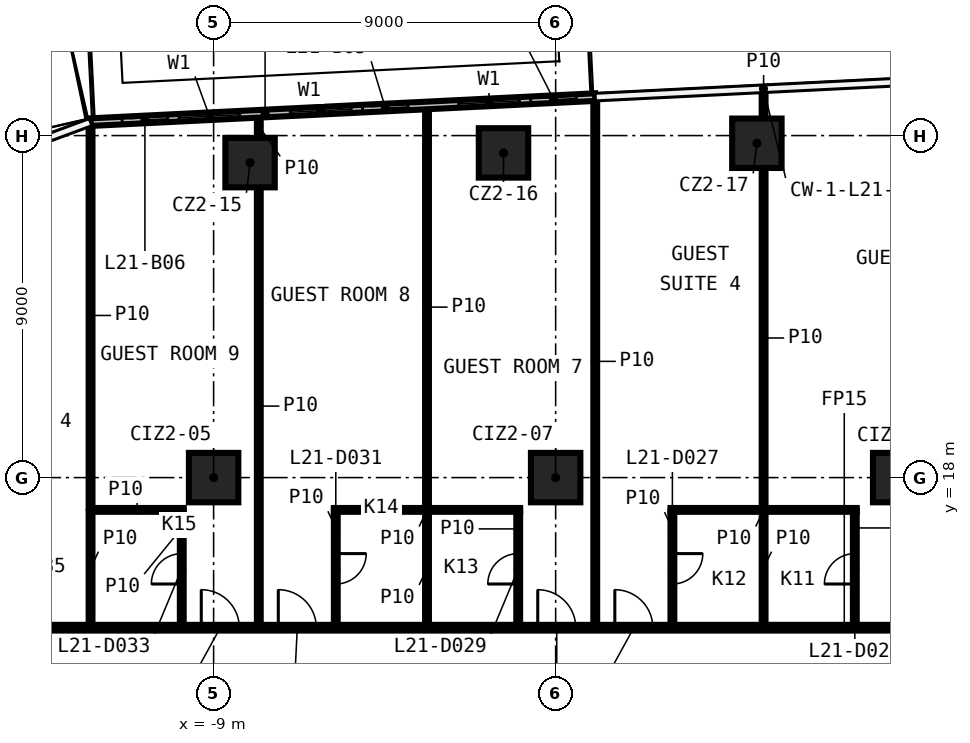
"""IFC4 building model, lengths in metres.
Left out: names, types, materials, properties, quantities, classifications, styles, units other than length and angle.
Written with IfcOpenShell. Run it as: python <this file> out.ifc"""

import sys

from ifc_helpers import new_model, si_unit, direction, frame, frame_2d, origin, origin_2d, place, context, subcontext, project, spatial, rectangle, extrude, element, fill, save


model = new_model("IFC4")
c1 = context("Model", 3, precision=1e-05, world=origin(), true_north=direction((0.0, 1.0)))
c2 = subcontext(c1, "Body", "Model", "MODEL_VIEW")
j1 = project(units=[si_unit("LENGTHUNIT", "METRE"), si_unit("PLANEANGLEUNIT", "RADIAN")], contexts=[c1])
p1 = place(None, origin())
s1 = spatial("IfcSite", under=j1, at=p1, CompositionType="ELEMENT")
p2 = place(p1, origin())
s2 = spatial("IfcBuilding", under=s1, at=p2, CompositionType="ELEMENT")
p3 = place(p2, frame((0.0, 0.0, 102.6)))
s3 = spatial("IfcBuildingStorey", under=s2, at=p3, CompositionType="ELEMENT", Elevation=102.6)
for number, where, z_axis, x_axis in (
    (1, (-8.041, 26.288, 0.0), (0.0, 0.0, 1.0), (1.0, 0.0, 0.0)),
    (2, (-1.372, 26.544, 0.0), (0.0, 0.0, 1.0), (1.0, 0.0, 0.0)),
    (3, (5.295, 26.798, 0.0), (0.0, 0.0, 1.0), (1.0, 0.0, 0.0)),
    (4, (-9.0, 18.0, 0.0), (0.0, 0.0, 1.0), (1.0, 0.0, 0.0)),
    (5, (0.0, 18.0, 0.0), (0.0, 0.0, 1.0), (1.0, 0.0, 0.0)),
    (6, (9.0, 18.0, 0.0), (0.0, 0.0, 1.0), (1.0, 0.0, 0.0)),
):
    element("IfcColumn", number, at=place(p3, frame(where, z_axis=z_axis, x_axis=x_axis)), inside=s3, PredefinedType="COLUMN", context=c2, shape_type="SweptSolid", body=[
        extrude(rectangle(XDim=1.3, YDim=1.3, at=origin_2d()), origin(), (0.0, 0.0, 1.0), 3.3),
    ])
p4 = place(p3, frame((-17.125, 14.05, 0.0), z_axis=(0.0, 0.0, 1.0), x_axis=(1.0, 0.0, 0.0)))
e7 = element("IfcWall", 7, at=p4, inside=s3, PredefinedType="PARTITIONING", context=c2, shape_type="SweptSolid", body=[
    extrude(rectangle(XDim=34.25, YDim=0.15, at=frame_2d((17.125, 0.0))), origin(), (0.0, 0.0, 1.0), 3.3),
])
p5 = place(p4, frame((29.757, 0.0, 0.0)))
e8 = element("IfcOpeningElement", 8, at=p5, cuts=e7, PredefinedType="OPENING", context=c2, shape_type="SweptSolid", body=[
    extrude(rectangle(XDim=1.0, YDim=2.1, at=frame_2d((0.5, 1.05))), frame((0.0, 0.085, 0.0), z_axis=(0.0, -1.0, 0.0), x_axis=(1.0, 0.0, 0.0)), (0.0, 0.0, 1.0), 0.17),
])
p6 = place(p4, frame((18.682, 0.0, 0.0)))
e9 = element("IfcOpeningElement", 9, at=p6, cuts=e7, PredefinedType="OPENING", context=c2, shape_type="SweptSolid", body=[
    extrude(rectangle(XDim=1.0, YDim=2.1, at=frame_2d((0.5, 1.05))), frame((0.0, 0.085, 0.0), z_axis=(0.0, -1.0, 0.0), x_axis=(1.0, 0.0, 0.0)), (0.0, 0.0, 1.0), 0.17),
])
p7 = place(p4, frame((16.654, 0.0, 0.0)))
e10 = element("IfcOpeningElement", 10, at=p7, cuts=e7, PredefinedType="OPENING", context=c2, shape_type="SweptSolid", body=[
    extrude(rectangle(XDim=1.0, YDim=2.1, at=frame_2d((0.5, 1.05))), frame((0.0, 0.085, 0.0), z_axis=(0.0, -1.0, 0.0), x_axis=(1.0, 0.0, 0.0)), (0.0, 0.0, 1.0), 0.17),
])
p8 = place(p4, frame((9.827, 0.0, 0.0)))
e11 = element("IfcOpeningElement", 11, at=p8, cuts=e7, PredefinedType="OPENING", context=c2, shape_type="SweptSolid", body=[
    extrude(rectangle(XDim=1.0, YDim=2.1, at=frame_2d((0.5, 1.05))), frame((0.0, 0.085, 0.0), z_axis=(0.0, -1.0, 0.0), x_axis=(1.0, 0.0, 0.0)), (0.0, 0.0, 1.0), 0.17),
])
p9 = place(p4, frame((7.8, 0.0, 0.0)))
e12 = element("IfcOpeningElement", 12, at=p9, cuts=e7, PredefinedType="OPENING", context=c2, shape_type="SweptSolid", body=[
    extrude(rectangle(XDim=1.0, YDim=2.1, at=frame_2d((0.5, 1.05))), frame((0.0, 0.085, 0.0), z_axis=(0.0, -1.0, 0.0), x_axis=(1.0, 0.0, 0.0)), (0.0, 0.0, 1.0), 0.17),
])
p10 = place(p4, frame((2.56, 0.0, 0.0)))
e13 = element("IfcOpeningElement", 13, at=p10, cuts=e7, PredefinedType="OPENING", context=c2, shape_type="SweptSolid", body=[
    extrude(rectangle(XDim=0.9, YDim=2.1, at=frame_2d((0.45, 1.05))), frame((0.0, 0.085, 0.0), z_axis=(0.0, -1.0, 0.0), x_axis=(1.0, 0.0, 0.0)), (0.0, 0.0, 1.0), 0.17),
])
p11 = place(p3, frame((-12.238, 17.15, 0.0), z_axis=(0.0, 0.0, 1.0), x_axis=(1.0, 0.0, 0.0)))
e14 = element("IfcWall", 14, at=p11, inside=s3, PredefinedType="PARTITIONING", context=c2, shape_type="SweptSolid", body=[
    extrude(rectangle(XDim=2.45, YDim=0.1, at=frame_2d((1.225, 0.0))), origin(), (0.0, 0.0, 1.0), 3.3),
])
for number, where, z_axis, x_axis in (
    (15, (-5.834, 17.15, 0.0), (0.0, 0.0, 1.0), (1.0, 0.0, 0.0)),
    (16, (3.022, 17.15, 0.0), (0.0, 0.0, 1.0), (1.0, 0.0, 0.0)),
):
    element("IfcWall", number, at=place(p3, frame(where, z_axis=z_axis, x_axis=x_axis)), inside=s3, PredefinedType="PARTITIONING", context=c2, shape_type="SweptSolid", body=[
        extrude(rectangle(XDim=4.9, YDim=0.1, at=frame_2d((2.45, 0.0))), origin(), (0.0, 0.0, 1.0), 3.3),
    ])
p12 = place(p3, frame((7.872, 14.125, 0.0), z_axis=(0.0, 0.0, 1.0), x_axis=(0.0, 1.0, 0.0)))
e17 = element("IfcWall", 17, at=p12, inside=s3, PredefinedType="PARTITIONING", context=c2, shape_type="SweptSolid", body=[
    extrude(rectangle(XDim=3.025, YDim=0.1, at=frame_2d((1.512, 0.0))), origin(), (0.0, 0.0, 1.0), 3.3),
])
p13 = place(p12, frame((1.075, 0.0, 0.0)))
e18 = element("IfcOpeningElement", 18, at=p13, cuts=e17, PredefinedType="OPENING", context=c2, shape_type="SweptSolid", body=[
    extrude(rectangle(XDim=0.8, YDim=2.1, at=frame_2d((0.4, 1.05))), frame((0.0, 0.06, 0.0), z_axis=(0.0, -1.0, 0.0), x_axis=(1.0, 0.0, 0.0)), (0.0, 0.0, 1.0), 0.12),
])
p14 = place(p3, frame((5.472, 14.125, 0.0), z_axis=(0.0, 0.0, 1.0), x_axis=(0.0, 1.0, 0.0)))
e19 = element("IfcWall", 19, at=p14, inside=s3, PredefinedType="PARTITIONING", context=c2, shape_type="SweptSolid", body=[
    extrude(rectangle(XDim=2.975, YDim=0.1, at=frame_2d((1.488, 0.0))), origin(), (0.0, 0.0, 1.0), 3.3),
])
p15 = place(p3, frame((5.472, 17.2, 0.0), z_axis=(0.0, 0.0, 1.0), x_axis=(0.0, 1.0, 0.0)))
e20 = element("IfcWall", 20, at=p15, inside=s3, PredefinedType="PARTITIONING", context=c2, shape_type="SweptSolid", body=[
    extrude(rectangle(XDim=8.948, YDim=0.1, at=frame_2d((4.474, 0.0))), origin(), (0.0, 0.0, 1.0), 3.3),
])
p16 = place(p3, frame((5.472, 27.448, 0.0), z_axis=(0.0, 0.0, 1.0), x_axis=(0.0, 1.0, 0.0)))
e21 = element("IfcWall", 21, at=p16, inside=s3, PredefinedType="PARTITIONING", context=c2, shape_type="SweptSolid", body=[
    extrude(rectangle(XDim=0.764, YDim=0.1, at=frame_2d((0.382, 0.0))), origin(), (0.0, 0.0, 1.0), 3.3),
])
p17 = place(p3, frame((3.072, 17.1, 0.0), z_axis=(0.0, 0.0, 1.0), x_axis=(0.0, -1.0, 0.0)))
e22 = element("IfcWall", 22, at=p17, inside=s3, PredefinedType="PARTITIONING", context=c2, shape_type="SweptSolid", body=[
    extrude(rectangle(XDim=2.975, YDim=0.1, at=frame_2d((1.488, 0.0))), origin(), (0.0, 0.0, 1.0), 3.3),
])
p18 = place(p17, frame((1.1, 0.0, 0.0)))
e23 = element("IfcOpeningElement", 23, at=p18, cuts=e22, PredefinedType="OPENING", context=c2, shape_type="SweptSolid", body=[
    extrude(rectangle(XDim=0.8, YDim=2.1, at=frame_2d((0.4, 1.05))), frame((0.0, 0.06, 0.0), z_axis=(0.0, -1.0, 0.0), x_axis=(1.0, 0.0, 0.0)), (0.0, 0.0, 1.0), 0.12),
])
p19 = place(p3, frame((1.042, 14.125, 0.0), z_axis=(0.0, 0.0, 1.0), x_axis=(0.0, 1.0, 0.0)))
e24 = element("IfcWall", 24, at=p19, inside=s3, PredefinedType="PARTITIONING", context=c2, shape_type="SweptSolid", body=[
    extrude(rectangle(XDim=13.867, YDim=0.1, at=frame_2d((6.934, 0.0))), origin(), (0.0, 0.0, 1.0), 3.3),
])
p20 = place(p3, frame((-0.985, 14.125, 0.0), z_axis=(0.0, 0.0, 1.0), x_axis=(0.0, 1.0, 0.0)))
e25 = element("IfcWall", 25, at=p20, inside=s3, PredefinedType="PARTITIONING", context=c2, shape_type="SweptSolid", body=[
    extrude(rectangle(XDim=2.975, YDim=0.1, at=frame_2d((1.488, 0.0))), origin(), (0.0, 0.0, 1.0), 3.3),
])
p21 = place(p20, frame((1.075, 0.0, 0.0)))
e26 = element("IfcOpeningElement", 26, at=p21, cuts=e25, PredefinedType="OPENING", context=c2, shape_type="SweptSolid", body=[
    extrude(rectangle(XDim=0.8, YDim=2.1, at=frame_2d((0.4, 1.05))), frame((0.0, 0.06, 0.0), z_axis=(0.0, -1.0, 0.0), x_axis=(1.0, 0.0, 0.0)), (0.0, 0.0, 1.0), 0.12),
])
p22 = place(p3, frame((-3.385, 14.125, 0.0), z_axis=(0.0, 0.0, 1.0), x_axis=(0.0, 1.0, 0.0)))
e27 = element("IfcWall", 27, at=p22, inside=s3, PredefinedType="PARTITIONING", context=c2, shape_type="SweptSolid", body=[
    extrude(rectangle(XDim=2.975, YDim=0.1, at=frame_2d((1.488, 0.0))), origin(), (0.0, 0.0, 1.0), 3.3),
])
p23 = place(p3, frame((-3.385, 17.2, 0.0), z_axis=(0.0, 0.0, 1.0), x_axis=(0.0, 1.0, 0.0)))
e28 = element("IfcWall", 28, at=p23, inside=s3, PredefinedType="PARTITIONING", context=c2, shape_type="SweptSolid", body=[
    extrude(rectangle(XDim=10.573, YDim=0.1, at=frame_2d((5.287, 0.0))), origin(), (0.0, 0.0, 1.0), 3.3),
])
p24 = place(p3, frame((-5.785, 17.15, 0.0), z_axis=(0.0, 0.0, 1.0), x_axis=(0.0, -1.0, 0.0)))
e29 = element("IfcWall", 29, at=p24, inside=s3, PredefinedType="PARTITIONING", context=c2, shape_type="SweptSolid", body=[
    extrude(rectangle(XDim=3.025, YDim=0.1, at=frame_2d((1.512, 0.0))), origin(), (0.0, 0.0, 1.0), 3.3),
])
p25 = place(p24, frame((1.15, 0.0, 0.0)))
e30 = element("IfcOpeningElement", 30, at=p25, cuts=e29, PredefinedType="OPENING", context=c2, shape_type="SweptSolid", body=[
    extrude(rectangle(XDim=0.8, YDim=2.1, at=frame_2d((0.4, 1.05))), frame((0.0, 0.06, 0.0), z_axis=(0.0, -1.0, 0.0), x_axis=(1.0, 0.0, 0.0)), (0.0, 0.0, 1.0), 0.12),
])
p26 = place(p3, frame((-7.811, 14.125, 0.0), z_axis=(0.0, 0.0, 1.0), x_axis=(0.0, 1.0, 0.0)))
e31 = element("IfcWall", 31, at=p26, inside=s3, PredefinedType="PARTITIONING", context=c2, shape_type="SweptSolid", body=[
    extrude(rectangle(XDim=11.513, YDim=0.1, at=frame_2d((5.756, 0.0))), origin(), (0.0, 0.0, 1.0), 3.3),
])
p27 = place(p3, frame((-7.811, 26.938, 0.0), z_axis=(0.0, 0.0, 1.0), x_axis=(0.0, 1.0, 0.0)))
e32 = element("IfcWall", 32, at=p27, inside=s3, PredefinedType="PARTITIONING", context=c2, shape_type="SweptSolid", body=[
    extrude(rectangle(XDim=0.615, YDim=0.1, at=frame_2d((0.308, 0.0))), origin(), (0.0, 0.0, 1.0), 3.3),
])
p28 = place(p3, frame((-9.838, 14.125, 0.0), z_axis=(0.0, 0.0, 1.0), x_axis=(0.0, 1.0, 0.0)))
e33 = element("IfcWall", 33, at=p28, inside=s3, PredefinedType="PARTITIONING", context=c2, shape_type="SweptSolid", body=[
    extrude(rectangle(XDim=3.025, YDim=0.1, at=frame_2d((1.512, 0.0))), origin(), (0.0, 0.0, 1.0), 3.3),
])
p29 = place(p28, frame((1.075, 0.0, 0.0)))
e34 = element("IfcOpeningElement", 34, at=p29, cuts=e33, PredefinedType="OPENING", context=c2, shape_type="SweptSolid", body=[
    extrude(rectangle(XDim=0.8, YDim=2.1, at=frame_2d((0.4, 1.05))), frame((0.0, 0.06, 0.0), z_axis=(0.0, -1.0, 0.0), x_axis=(1.0, 0.0, 0.0)), (0.0, 0.0, 1.0), 0.12),
])
p30 = place(p3, frame((-12.238, 14.125, 0.0), z_axis=(0.0, 0.0, 1.0), x_axis=(0.0, 1.0, 0.0)))
e35 = element("IfcWall", 35, at=p30, inside=s3, PredefinedType="PARTITIONING", context=c2, shape_type="SweptSolid", body=[
    extrude(rectangle(XDim=2.975, YDim=0.1, at=frame_2d((1.488, 0.0))), origin(), (0.0, 0.0, 1.0), 3.3),
])
p31 = place(p3, frame((-12.238, 17.2, 0.0), z_axis=(0.0, 0.0, 1.0), x_axis=(0.0, 1.0, 0.0)))
e36 = element("IfcWall", 36, at=p31, inside=s3, PredefinedType="PARTITIONING", context=c2, shape_type="SweptSolid", body=[
    extrude(rectangle(XDim=10.133, YDim=0.1, at=frame_2d((5.067, 0.0))), origin(), (0.0, 0.0, 1.0), 3.3),
])
p32 = place(p3, frame((1.042, 28.012, 0.0), z_axis=(0.0, 0.0, 1.0), x_axis=(-0.998772222794, -0.049538338427, 0.0)))
e37 = element("IfcWall", 37, at=p32, inside=s3, PredefinedType="SOLIDWALL", context=c2, shape_type="SweptSolid", body=[
    extrude(rectangle(XDim=13.297, YDim=0.2, at=frame_2d((6.648, 0.0))), origin(), (0.0, 0.0, 1.0), 3.25),
])
p33 = place(p32, frame((2.0, 0.0, 0.6)))
e38 = element("IfcOpeningElement", 38, at=p33, cuts=e37, PredefinedType="OPENING", context=c2, shape_type="SweptSolid", body=[
    extrude(rectangle(XDim=1.6, YDim=2.4, at=frame_2d((0.8, 1.2))), frame((0.0, 0.11, 0.0), z_axis=(0.0, -1.0, 0.0), x_axis=(1.0, 0.0, 0.0)), (0.0, 0.0, 1.0), 0.22),
])
p34 = place(p32, frame((0.5, 0.0, 0.0)))
e39 = element("IfcOpeningElement", 39, at=p34, cuts=e37, PredefinedType="OPENING", context=c2, shape_type="SweptSolid", body=[
    extrude(rectangle(XDim=1.2, YDim=2.4, at=frame_2d((0.6, 1.2))), frame((0.0, 0.11, 0.0), z_axis=(0.0, -1.0, 0.0), x_axis=(1.0, 0.0, 0.0)), (0.0, 0.0, 1.0), 0.22),
])
p35 = place(p32, frame((6.432, 0.0, 0.6)))
e40 = element("IfcOpeningElement", 40, at=p35, cuts=e37, PredefinedType="OPENING", context=c2, shape_type="SweptSolid", body=[
    extrude(rectangle(XDim=1.6, YDim=2.4, at=frame_2d((0.8, 1.2))), frame((0.0, 0.11, 0.0), z_axis=(0.0, -1.0, 0.0), x_axis=(1.0, 0.0, 0.0)), (0.0, 0.0, 1.0), 0.22),
])
p36 = place(p32, frame((4.932, 0.0, 0.0)))
e41 = element("IfcOpeningElement", 41, at=p36, cuts=e37, PredefinedType="OPENING", context=c2, shape_type="SweptSolid", body=[
    extrude(rectangle(XDim=1.2, YDim=2.4, at=frame_2d((0.6, 1.2))), frame((0.0, 0.11, 0.0), z_axis=(0.0, -1.0, 0.0), x_axis=(1.0, 0.0, 0.0)), (0.0, 0.0, 1.0), 0.22),
])
p37 = place(p32, frame((9.365, 0.0, 0.6)))
e42 = element("IfcOpeningElement", 42, at=p37, cuts=e37, PredefinedType="OPENING", context=c2, shape_type="SweptSolid", body=[
    extrude(rectangle(XDim=1.6, YDim=2.4, at=frame_2d((0.8, 1.2))), frame((0.0, 0.11, 0.0), z_axis=(0.0, -1.0, 0.0), x_axis=(1.0, 0.0, 0.0)), (0.0, 0.0, 1.0), 0.22),
])
p38 = place(p32, frame((11.264, 0.0, 0.0)))
e43 = element("IfcOpeningElement", 43, at=p38, cuts=e37, PredefinedType="OPENING", context=c2, shape_type="SweptSolid", body=[
    extrude(rectangle(XDim=1.2, YDim=2.4, at=frame_2d((0.6, 1.2))), frame((0.0, 0.11, 0.0), z_axis=(0.0, -1.0, 0.0), x_axis=(1.0, 0.0, 0.0)), (0.0, 0.0, 1.0), 0.22),
])
p39 = place(p13, origin())
e44 = element("IfcDoor", 44, at=p39, inside=s3, OperationType="SINGLE_SWING_RIGHT", PredefinedType="DOOR", context=c2, shape_type="SweptSolid", body=[
    extrude(rectangle(XDim=0.8, YDim=2.1, at=frame_2d((0.4, 1.05))), frame((0.0, 0.025, 0.0), z_axis=(0.0, -1.0, 0.0), x_axis=(1.0, 0.0, 0.0)), (0.0, 0.0, 1.0), 0.05),
])
fill(e18, e44)
p40 = place(p18, origin())
e45 = element("IfcDoor", 45, at=p40, inside=s3, OperationType="SINGLE_SWING_LEFT", PredefinedType="DOOR", context=c2, shape_type="SweptSolid", body=[
    extrude(rectangle(XDim=0.8, YDim=2.1, at=frame_2d((0.4, 1.05))), frame((0.0, 0.025, 0.0), z_axis=(0.0, -1.0, 0.0), x_axis=(1.0, 0.0, 0.0)), (0.0, 0.0, 1.0), 0.05),
])
fill(e23, e45)
p41 = place(p6, origin())
e46 = element("IfcDoor", 46, at=p41, inside=s3, OperationType="SINGLE_SWING_RIGHT", PredefinedType="DOOR", context=c2, shape_type="SweptSolid", body=[
    extrude(rectangle(XDim=1.0, YDim=2.1, at=frame_2d((0.5, 1.05))), frame((0.0, 0.025, 0.0), z_axis=(0.0, -1.0, 0.0), x_axis=(1.0, 0.0, 0.0)), (0.0, 0.0, 1.0), 0.05),
])
fill(e9, e46)
p42 = place(p21, origin())
e47 = element("IfcDoor", 47, at=p42, inside=s3, OperationType="SINGLE_SWING_RIGHT", PredefinedType="DOOR", context=c2, shape_type="SweptSolid", body=[
    extrude(rectangle(XDim=0.8, YDim=2.1, at=frame_2d((0.4, 1.05))), frame((0.0, 0.025, 0.0), z_axis=(0.0, -1.0, 0.0), x_axis=(1.0, 0.0, 0.0)), (0.0, 0.0, 1.0), 0.05),
])
fill(e26, e47)
p43 = place(p7, origin())
e48 = element("IfcDoor", 48, at=p43, inside=s3, OperationType="SINGLE_SWING_LEFT", PredefinedType="DOOR", context=c2, shape_type="SweptSolid", body=[
    extrude(rectangle(XDim=1.0, YDim=2.1, at=frame_2d((0.5, 1.05))), frame((0.0, 0.025, 0.0), z_axis=(0.0, -1.0, 0.0), x_axis=(1.0, 0.0, 0.0)), (0.0, 0.0, 1.0), 0.05),
])
fill(e10, e48)
p44 = place(p25, origin())
e49 = element("IfcDoor", 49, at=p44, inside=s3, OperationType="SINGLE_SWING_LEFT", PredefinedType="DOOR", context=c2, shape_type="SweptSolid", body=[
    extrude(rectangle(XDim=0.8, YDim=2.1, at=frame_2d((0.4, 1.05))), frame((0.0, 0.025, 0.0), z_axis=(0.0, -1.0, 0.0), x_axis=(1.0, 0.0, 0.0)), (0.0, 0.0, 1.0), 0.05),
])
fill(e30, e49)
p45 = place(p8, origin())
e50 = element("IfcDoor", 50, at=p45, inside=s3, OperationType="SINGLE_SWING_RIGHT", PredefinedType="DOOR", context=c2, shape_type="SweptSolid", body=[
    extrude(rectangle(XDim=1.0, YDim=2.1, at=frame_2d((0.5, 1.05))), frame((0.0, 0.025, 0.0), z_axis=(0.0, -1.0, 0.0), x_axis=(1.0, 0.0, 0.0)), (0.0, 0.0, 1.0), 0.05),
])
fill(e11, e50)
p46 = place(p29, origin())
e51 = element("IfcDoor", 51, at=p46, inside=s3, OperationType="SINGLE_SWING_RIGHT", PredefinedType="DOOR", context=c2, shape_type="SweptSolid", body=[
    extrude(rectangle(XDim=0.8, YDim=2.1, at=frame_2d((0.4, 1.05))), frame((0.0, 0.025, 0.0), z_axis=(0.0, -1.0, 0.0), x_axis=(1.0, 0.0, 0.0)), (0.0, 0.0, 1.0), 0.05),
])
fill(e34, e51)
p47 = place(p9, origin())
e52 = element("IfcDoor", 52, at=p47, inside=s3, OperationType="SINGLE_SWING_LEFT", PredefinedType="DOOR", context=c2, shape_type="SweptSolid", body=[
    extrude(rectangle(XDim=1.0, YDim=2.1, at=frame_2d((0.5, 1.05))), frame((0.0, 0.025, 0.0), z_axis=(0.0, -1.0, 0.0), x_axis=(1.0, 0.0, 0.0)), (0.0, 0.0, 1.0), 0.05),
])
fill(e12, e52)
p48 = place(p33, origin())
e53 = element("IfcWindow", 53, at=p48, inside=s3, PartitioningType="SINGLE_PANEL", PredefinedType="WINDOW", context=c2, shape_type="SweptSolid", body=[
    extrude(rectangle(XDim=1.6, YDim=2.4, at=frame_2d((0.8, 1.2))), frame((0.0, 0.03, 0.0), z_axis=(0.0, -1.0, 0.0), x_axis=(1.0, 0.0, 0.0)), (0.0, 0.0, 1.0), 0.06),
])
fill(e38, e53)
p49 = place(p34, origin())
e54 = element("IfcDoor", 54, at=p49, inside=s3, OperationType="SLIDING_TO_LEFT", PredefinedType="DOOR", context=c2, shape_type="SweptSolid", body=[
    extrude(rectangle(XDim=1.2, YDim=2.4, at=frame_2d((0.6, 1.2))), frame((0.0, 0.025, 0.0), z_axis=(0.0, -1.0, 0.0), x_axis=(1.0, 0.0, 0.0)), (0.0, 0.0, 1.0), 0.05),
])
fill(e39, e54)
p50 = place(p35, origin())
e55 = element("IfcWindow", 55, at=p50, inside=s3, PartitioningType="SINGLE_PANEL", PredefinedType="WINDOW", context=c2, shape_type="SweptSolid", body=[
    extrude(rectangle(XDim=1.6, YDim=2.4, at=frame_2d((0.8, 1.2))), frame((0.0, 0.03, 0.0), z_axis=(0.0, -1.0, 0.0), x_axis=(1.0, 0.0, 0.0)), (0.0, 0.0, 1.0), 0.06),
])
fill(e40, e55)
p51 = place(p36, origin())
e56 = element("IfcDoor", 56, at=p51, inside=s3, OperationType="SLIDING_TO_LEFT", PredefinedType="DOOR", context=c2, shape_type="SweptSolid", body=[
    extrude(rectangle(XDim=1.2, YDim=2.4, at=frame_2d((0.6, 1.2))), frame((0.0, 0.025, 0.0), z_axis=(0.0, -1.0, 0.0), x_axis=(1.0, 0.0, 0.0)), (0.0, 0.0, 1.0), 0.05),
])
fill(e41, e56)
p52 = place(p37, origin())
e57 = element("IfcWindow", 57, at=p52, inside=s3, PartitioningType="SINGLE_PANEL", PredefinedType="WINDOW", context=c2, shape_type="SweptSolid", body=[
    extrude(rectangle(XDim=1.6, YDim=2.4, at=frame_2d((0.8, 1.2))), frame((0.0, 0.03, 0.0), z_axis=(0.0, -1.0, 0.0), x_axis=(1.0, 0.0, 0.0)), (0.0, 0.0, 1.0), 0.06),
])
fill(e42, e57)
p53 = place(p38, origin())
e58 = element("IfcDoor", 58, at=p53, inside=s3, OperationType="SLIDING_TO_LEFT", PredefinedType="DOOR", context=c2, shape_type="SweptSolid", body=[
    extrude(rectangle(XDim=1.2, YDim=2.4, at=frame_2d((0.6, 1.2))), frame((0.0, 0.025, 0.0), z_axis=(0.0, -1.0, 0.0), x_axis=(1.0, 0.0, 0.0)), (0.0, 0.0, 1.0), 0.05),
])
fill(e43, e58)
save(model, sys.argv[1])
